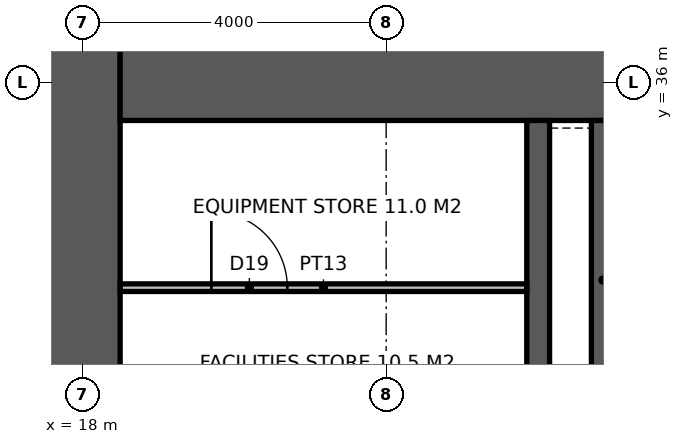
"""IFC4 building model, lengths in metres.
Left out: names, types, materials, properties, quantities, classifications, styles, units other than length and angle.
Written with IfcOpenShell. Run it as: python <this file> out.ifc"""

import sys

from ifc_helpers import new_model, si_unit, direction, frame, frame_2d, origin, place, context, subcontext, project, spatial, rectangle, extrude, element, fill, save


model = new_model("IFC4")
c1 = context("Model", 3, precision=1e-05, world=origin(), true_north=direction((0.0, 1.0)))
c2 = subcontext(c1, "Body", "Model", "MODEL_VIEW")
j1 = project(units=[si_unit("LENGTHUNIT", "METRE"), si_unit("PLANEANGLEUNIT", "RADIAN")], contexts=[c1])
p1 = place(None, origin())
s1 = spatial("IfcSite", under=j1, at=p1, CompositionType="ELEMENT")
p2 = place(p1, origin())
s2 = spatial("IfcBuilding", under=s1, at=p2, CompositionType="ELEMENT")
p3 = place(p2, frame((0.0, 0.0, 47.0)))
s3 = spatial("IfcBuildingStorey", under=s2, at=p3, CompositionType="ELEMENT", Elevation=47.0)
p4 = place(p3, frame((18.0, 17.1, -0.15), z_axis=(0.0, 0.0, 1.0), x_axis=(0.0, 1.0, 0.0)))
e1 = element("IfcWall", 1, at=p4, inside=s3, PredefinedType="SHEAR", context=c2, shape_type="SweptSolid", body=[
    extrude(rectangle(XDim=19.8, YDim=1.0, at=frame_2d((9.9, 0.0))), origin(), (0.0, 0.0, 1.0), 4.0),
])
p5 = place(p3, frame((18.5, 36.2, -0.15), z_axis=(0.0, 0.0, 1.0), x_axis=(1.0, 0.0, 0.0)))
e2 = element("IfcWall", 2, at=p5, inside=s3, PredefinedType="SHEAR", context=c2, shape_type="SweptSolid", body=[
    extrude(rectangle(XDim=23.4, YDim=1.4, at=frame_2d((11.7, 0.0))), origin(), (0.0, 0.0, 1.0), 4.0),
])
p6 = place(p3, frame((24.0, 18.5, -0.15), z_axis=(0.0, 0.0, 1.0), x_axis=(0.0, 1.0, 0.0)))
e3 = element("IfcWall", 3, at=p6, inside=s3, PredefinedType="SHEAR", context=c2, shape_type="SweptSolid", body=[
    extrude(rectangle(XDim=17.0, YDim=0.3, at=frame_2d((8.5, 0.0))), origin(), (0.0, 0.0, 1.0), 4.0),
])
p7 = place(p6, frame((9.6, 0.0, 0.15)))
e4 = element("IfcOpeningElement", 4, at=p7, cuts=e3, PredefinedType="OPENING", context=c2, shape_type="SweptSolid", body=[
    extrude(rectangle(XDim=1.5, YDim=2.4, at=frame_2d((0.75, 1.2))), frame((0.0, 0.16, 0.0), z_axis=(0.0, -1.0, 0.0), x_axis=(1.0, 0.0, 0.0)), (0.0, 0.0, 1.0), 0.32),
])
p8 = place(p3, frame((24.85, 31.3, -0.15), z_axis=(0.0, 0.0, 1.0), x_axis=(0.0, 1.0, 0.0)))
e5 = element("IfcWall", 5, at=p8, inside=s3, PredefinedType="SHEAR", context=c2, shape_type="SweptSolid", body=[
    extrude(rectangle(XDim=4.2, YDim=0.3, at=frame_2d((2.1, 0.0))), origin(), (0.0, 0.0, 1.0), 4.0),
])
p9 = place(p3, frame((18.5, 33.3, 0.0), z_axis=(0.0, 0.0, 1.0), x_axis=(1.0, 0.0, 0.0)))
e6 = element("IfcWall", 6, at=p9, inside=s3, PredefinedType="PARTITIONING", context=c2, shape_type="SweptSolid", body=[
    extrude(rectangle(XDim=5.35, YDim=0.1, at=frame_2d((2.675, 0.0))), origin(), (0.0, 0.0, 1.0), 3.85),
])
p10 = place(p9, frame((1.2, 0.0, 0.0)))
e7 = element("IfcOpeningElement", 7, at=p10, cuts=e6, PredefinedType="OPENING", context=c2, shape_type="SweptSolid", body=[
    extrude(rectangle(XDim=1.0, YDim=2.2, at=frame_2d((0.5, 1.1))), frame((0.0, 0.06, 0.0), z_axis=(0.0, -1.0, 0.0), x_axis=(1.0, 0.0, 0.0)), (0.0, 0.0, 1.0), 0.12),
])
p11 = place(p10, origin())
e8 = element("IfcDoor", 8, at=p11, inside=s3, OperationType="SINGLE_SWING_LEFT", PredefinedType="DOOR", context=c2, shape_type="SweptSolid", body=[
    extrude(rectangle(XDim=1.0, YDim=2.2, at=frame_2d((0.5, 1.1))), frame((0.0, 0.025, 0.0), z_axis=(0.0, -1.0, 0.0), x_axis=(1.0, 0.0, 0.0)), (0.0, 0.0, 1.0), 0.05),
])
fill(e7, e8)
save(model, sys.argv[1])
